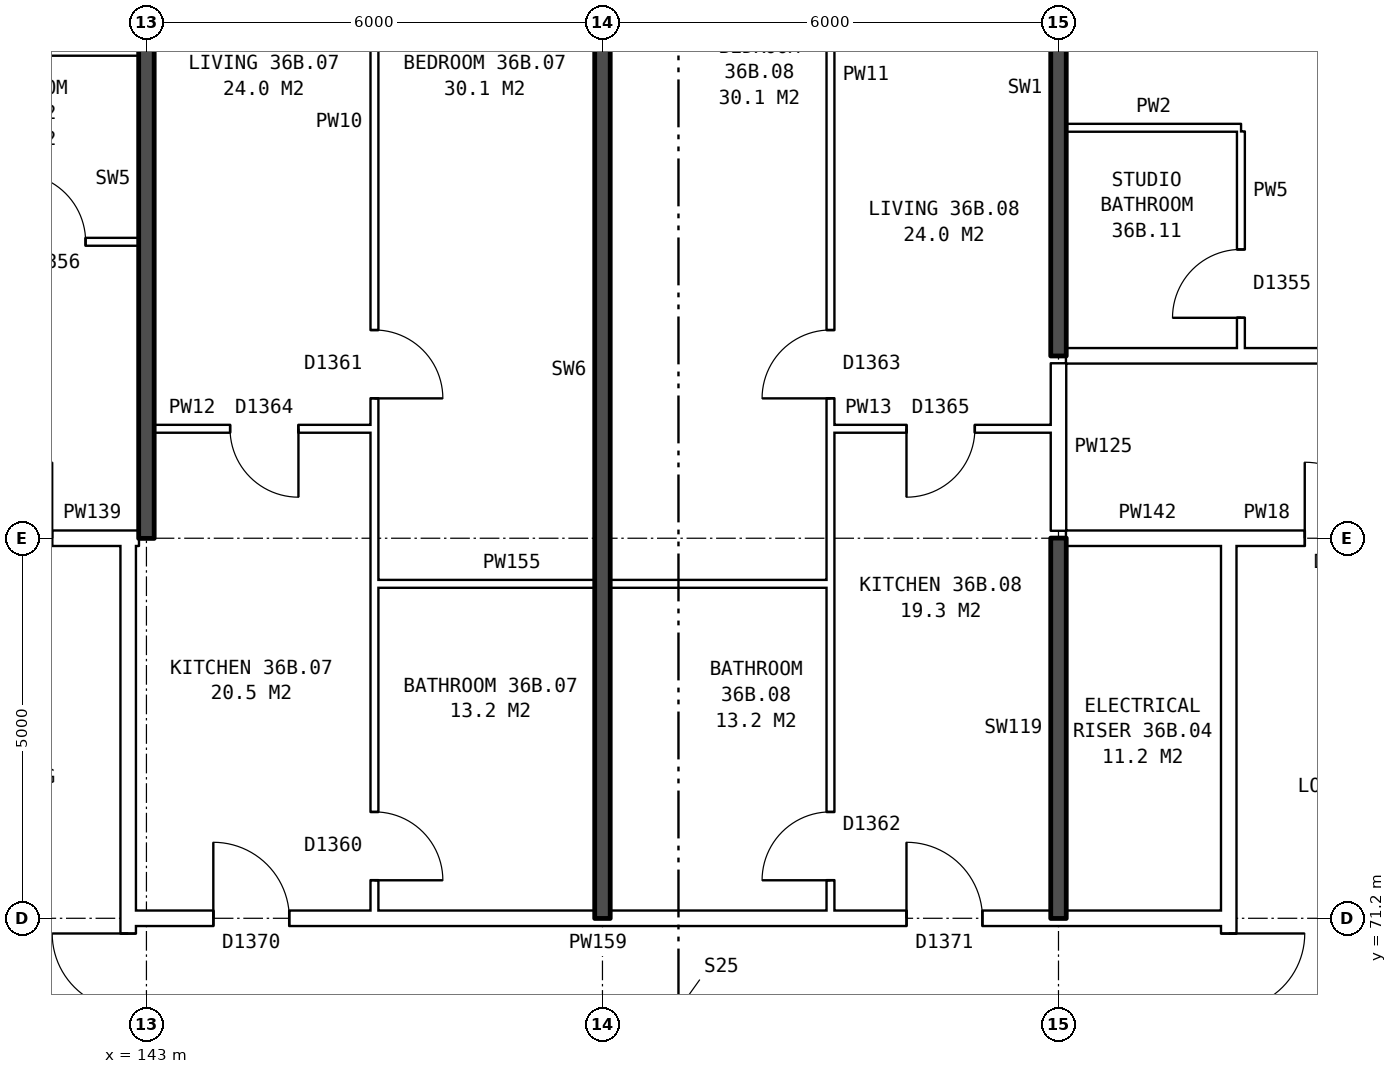
"""IFC4 building model, lengths in metres.
Left out: names, types, materials, properties, quantities, classifications, styles, units other than length and angle.
Written with IfcOpenShell. Run it as: python <this file> out.ifc"""

import sys

from ifc_helpers import new_model, si_unit, direction, frame, frame_2d, origin, place, context, subcontext, project, spatial, rectangle, extrude, element, fill, save


model = new_model("IFC4")
c1 = context("Model", 3, precision=1e-05, world=origin(), true_north=direction((0.0, 1.0)))
c2 = subcontext(c1, "Body", "Model", "MODEL_VIEW")
j1 = project(units=[si_unit("LENGTHUNIT", "METRE"), si_unit("PLANEANGLEUNIT", "RADIAN")], contexts=[c1])
p1 = place(None, origin())
s1 = spatial("IfcSite", under=j1, at=p1, CompositionType="ELEMENT")
p2 = place(p1, origin())
s2 = spatial("IfcBuilding", under=s1, at=p2, CompositionType="ELEMENT")
p3 = place(p2, frame((0.0, 0.0, 129.9)))
s3 = spatial("IfcBuildingStorey", under=s2, at=p3, CompositionType="ELEMENT", Elevation=129.9)
p4 = place(p3, frame((142.76, 63.9, 0.0), z_axis=(0.0, 0.0, 1.0), x_axis=(0.0, 1.0, 0.0)))
e1 = element("IfcWall", 1, at=p4, inside=s3, PredefinedType="PARTITIONING", context=c2, shape_type="SweptSolid", body=[
    extrude(rectangle(XDim=12.2, YDim=0.2, at=frame_2d((6.1, 0.0))), origin(), (0.0, 0.0, 1.0), 2.85),
])
p5 = place(p4, frame((5.1, 0.0, 0.0)))
e2 = element("IfcOpeningElement", 2, at=p5, cuts=e1, PredefinedType="OPENING", context=c2, shape_type="SweptSolid", body=[
    extrude(rectangle(XDim=2.0, YDim=2.1, at=frame_2d((1.0, 1.05))), frame((0.0, 0.11, 0.0), z_axis=(0.0, -1.0, 0.0), x_axis=(1.0, 0.0, 0.0)), (0.0, 0.0, 1.0), 0.22),
])
p6 = place(p3, frame((157.24, 63.9, 0.0), z_axis=(0.0, 0.0, 1.0), x_axis=(0.0, 1.0, 0.0)))
e3 = element("IfcWall", 3, at=p6, inside=s3, PredefinedType="PARTITIONING", context=c2, shape_type="SweptSolid", body=[
    extrude(rectangle(XDim=12.2, YDim=0.2, at=frame_2d((6.1, 0.0))), origin(), (0.0, 0.0, 1.0), 2.85),
])
p7 = place(p6, frame((5.1, 0.0, 0.0)))
e4 = element("IfcOpeningElement", 4, at=p7, cuts=e3, PredefinedType="OPENING", context=c2, shape_type="SweptSolid", body=[
    extrude(rectangle(XDim=2.0, YDim=2.1, at=frame_2d((1.0, 1.05))), frame((0.0, 0.11, 0.0), z_axis=(0.0, -1.0, 0.0), x_axis=(1.0, 0.0, 0.0)), (0.0, 0.0, 1.0), 0.22),
])
p8 = place(p3, frame((142.76, 71.2, 0.0), z_axis=(0.0, 0.0, 1.0), x_axis=(1.0, 0.0, 0.0)))
e5 = element("IfcWall", 5, at=p8, inside=s3, PredefinedType="PARTITIONING", context=c2, shape_type="SweptSolid", body=[
    extrude(rectangle(XDim=14.48, YDim=0.2, at=frame_2d((7.24, 0.0))), origin(), (0.0, 0.0, 1.0), 2.85),
])
p9 = place(p8, frame((1.12, 0.0, 0.0)))
e6 = element("IfcOpeningElement", 6, at=p9, cuts=e5, PredefinedType="OPENING", context=c2, shape_type="SweptSolid", body=[
    extrude(rectangle(XDim=1.0, YDim=2.1, at=frame_2d((0.5, 1.05))), frame((0.0, 0.11, 0.0), z_axis=(0.0, -1.0, 0.0), x_axis=(1.0, 0.0, 0.0)), (0.0, 0.0, 1.0), 0.22),
])
p10 = place(p8, frame((10.24, 0.0, 0.0)))
e7 = element("IfcOpeningElement", 7, at=p10, cuts=e5, PredefinedType="OPENING", context=c2, shape_type="SweptSolid", body=[
    extrude(rectangle(XDim=1.0, YDim=2.1, at=frame_2d((0.5, 1.05))), frame((0.0, 0.11, 0.0), z_axis=(0.0, -1.0, 0.0), x_axis=(1.0, 0.0, 0.0)), (0.0, 0.0, 1.0), 0.22),
])
p11 = place(p3, frame((146.0, 75.6, 0.0), z_axis=(0.0, 0.0, 1.0), x_axis=(1.0, 0.0, 0.0)))
e8 = element("IfcWall", 8, at=p11, inside=s3, PredefinedType="PARTITIONING", context=c2, shape_type="SweptSolid", body=[
    extrude(rectangle(XDim=6.0, YDim=0.1, at=frame_2d((3.0, 0.0))), origin(), (0.0, 0.0, 1.0), 2.85),
])
p12 = place(p3, frame((139.76, 76.2, 0.0), z_axis=(0.0, 0.0, 1.0), x_axis=(1.0, 0.0, 0.0)))
e9 = element("IfcWall", 9, at=p12, inside=s3, PredefinedType="PARTITIONING", context=c2, shape_type="SweptSolid", body=[
    extrude(rectangle(XDim=3.0, YDim=0.2, at=frame_2d((1.5, 0.0))), origin(), (0.0, 0.0, 1.0), 2.85),
])
p13 = place(p12, frame((1.0, 0.0, 0.0)))
e10 = element("IfcOpeningElement", 10, at=p13, cuts=e9, PredefinedType="OPENING", context=c2, shape_type="SweptSolid", body=[
    extrude(rectangle(XDim=1.0, YDim=2.1, at=frame_2d((0.5, 1.05))), frame((0.0, 0.11, 0.0), z_axis=(0.0, -1.0, 0.0), x_axis=(1.0, 0.0, 0.0)), (0.0, 0.0, 1.0), 0.22),
])
p14 = place(p3, frame((142.76, 76.2, 0.0), z_axis=(0.0, 0.0, 1.0), x_axis=(1.0, 0.0, 0.0)))
e11 = element("IfcWall", 11, at=p14, inside=s3, PredefinedType="PARTITIONING", context=c2, shape_type="SweptSolid", body=[
    extrude(rectangle(XDim=0.14, YDim=0.2, at=frame_2d((0.07, 0.0))), origin(), (0.0, 0.0, 1.0), 2.85),
])
p15 = place(p3, frame((155.1, 76.2, 0.0), z_axis=(0.0, 0.0, 1.0), x_axis=(1.0, 0.0, 0.0)))
e12 = element("IfcWall", 12, at=p15, inside=s3, PredefinedType="PARTITIONING", context=c2, shape_type="SweptSolid", body=[
    extrude(rectangle(XDim=2.14, YDim=0.2, at=frame_2d((1.07, 0.0))), origin(), (0.0, 0.0, 1.0), 2.85),
])
p16 = place(p3, frame((157.24, 76.2, 0.0), z_axis=(0.0, 0.0, 1.0), x_axis=(1.0, 0.0, 0.0)))
e13 = element("IfcWall", 13, at=p16, inside=s3, PredefinedType="PARTITIONING", context=c2, shape_type="SweptSolid", body=[
    extrude(rectangle(XDim=3.0, YDim=0.2, at=frame_2d((1.5, 0.0))), origin(), (0.0, 0.0, 1.0), 2.85),
])
p17 = place(p16, frame((1.0, 0.0, 0.0)))
e14 = element("IfcOpeningElement", 14, at=p17, cuts=e13, PredefinedType="OPENING", context=c2, shape_type="SweptSolid", body=[
    extrude(rectangle(XDim=1.0, YDim=2.1, at=frame_2d((0.5, 1.05))), frame((0.0, 0.11, 0.0), z_axis=(0.0, -1.0, 0.0), x_axis=(1.0, 0.0, 0.0)), (0.0, 0.0, 1.0), 0.22),
])
p18 = place(p3, frame((143.1, 77.64, 0.0), z_axis=(0.0, 0.0, 1.0), x_axis=(1.0, 0.0, 0.0)))
e15 = element("IfcWall", 15, at=p18, inside=s3, PredefinedType="PARTITIONING", context=c2, shape_type="SweptSolid", body=[
    extrude(rectangle(XDim=2.9, YDim=0.1, at=frame_2d((1.45, 0.0))), origin(), (0.0, 0.0, 1.0), 2.85),
])
p19 = place(p18, frame((1.0, 0.0, 0.0)))
e16 = element("IfcOpeningElement", 16, at=p19, cuts=e15, PredefinedType="OPENING", context=c2, shape_type="SweptSolid", body=[
    extrude(rectangle(XDim=0.9, YDim=2.1, at=frame_2d((0.45, 1.05))), frame((0.0, 0.06, 0.0), z_axis=(0.0, -1.0, 0.0), x_axis=(1.0, 0.0, 0.0)), (0.0, 0.0, 1.0), 0.12),
])
p20 = place(p3, frame((152.0, 77.64, 0.0), z_axis=(0.0, 0.0, 1.0), x_axis=(1.0, 0.0, 0.0)))
e17 = element("IfcWall", 17, at=p20, inside=s3, PredefinedType="PARTITIONING", context=c2, shape_type="SweptSolid", body=[
    extrude(rectangle(XDim=2.9, YDim=0.1, at=frame_2d((1.45, 0.0))), origin(), (0.0, 0.0, 1.0), 2.85),
])
p21 = place(p20, frame((1.0, 0.0, 0.0)))
e18 = element("IfcOpeningElement", 18, at=p21, cuts=e17, PredefinedType="OPENING", context=c2, shape_type="SweptSolid", body=[
    extrude(rectangle(XDim=0.9, YDim=2.1, at=frame_2d((0.45, 1.05))), frame((0.0, 0.06, 0.0), z_axis=(0.0, -1.0, 0.0), x_axis=(1.0, 0.0, 0.0)), (0.0, 0.0, 1.0), 0.12),
])
p22 = place(p3, frame((155.1, 78.6, 0.0), z_axis=(0.0, 0.0, 1.0), x_axis=(1.0, 0.0, 0.0)))
e19 = element("IfcWall", 19, at=p22, inside=s3, PredefinedType="PARTITIONING", context=c2, shape_type="SweptSolid", body=[
    extrude(rectangle(XDim=17.29, YDim=0.2, at=frame_2d((8.645, 0.0))), origin(), (0.0, 0.0, 1.0), 2.85),
])
p23 = place(p22, frame((3.6, 0.0, 0.0)))
e20 = element("IfcOpeningElement", 20, at=p23, cuts=e19, PredefinedType="OPENING", context=c2, shape_type="SweptSolid", body=[
    extrude(rectangle(XDim=1.0, YDim=2.1, at=frame_2d((0.5, 1.05))), frame((0.0, 0.11, 0.0), z_axis=(0.0, -1.0, 0.0), x_axis=(1.0, 0.0, 0.0)), (0.0, 0.0, 1.0), 0.22),
])
p24 = place(p22, frame((8.4, 0.0, 0.0)))
e21 = element("IfcOpeningElement", 21, at=p24, cuts=e19, PredefinedType="OPENING", context=c2, shape_type="SweptSolid", body=[
    extrude(rectangle(XDim=1.0, YDim=2.1, at=frame_2d((0.5, 1.05))), frame((0.0, 0.11, 0.0), z_axis=(0.0, -1.0, 0.0), x_axis=(1.0, 0.0, 0.0)), (0.0, 0.0, 1.0), 0.22),
])
p25 = place(p3, frame((137.1, 80.1, 0.0), z_axis=(0.0, 0.0, 1.0), x_axis=(1.0, 0.0, 0.0)))
e22 = element("IfcWall", 22, at=p25, inside=s3, PredefinedType="PARTITIONING", context=c2, shape_type="SweptSolid", body=[
    extrude(rectangle(XDim=5.8, YDim=0.1, at=frame_2d((2.9, 0.0))), origin(), (0.0, 0.0, 1.0), 2.85),
])
p26 = place(p25, frame((1.3, 0.0, 0.0)))
e23 = element("IfcOpeningElement", 23, at=p26, cuts=e22, PredefinedType="OPENING", context=c2, shape_type="SweptSolid", body=[
    extrude(rectangle(XDim=0.9, YDim=2.1, at=frame_2d((0.45, 1.05))), frame((0.0, 0.06, 0.0), z_axis=(0.0, -1.0, 0.0), x_axis=(1.0, 0.0, 0.0)), (0.0, 0.0, 1.0), 0.12),
])
p27 = place(p25, frame((4.2, 0.0, 0.0)))
e24 = element("IfcOpeningElement", 24, at=p27, cuts=e22, PredefinedType="OPENING", context=c2, shape_type="SweptSolid", body=[
    extrude(rectangle(XDim=0.9, YDim=2.1, at=frame_2d((0.45, 1.05))), frame((0.0, 0.06, 0.0), z_axis=(0.0, -1.0, 0.0), x_axis=(1.0, 0.0, 0.0)), (0.0, 0.0, 1.0), 0.12),
])
for number, where, z_axis, x_axis in (
    (25, (155.1, 81.6, 0.0), (0.0, 0.0, 1.0), (1.0, 0.0, 0.0)),
    (26, (140.6, 82.6, 0.0), (0.0, 0.0, 1.0), (1.0, 0.0, 0.0)),
):
    element("IfcWall", number, at=place(p3, frame(where, z_axis=z_axis, x_axis=x_axis)), inside=s3, PredefinedType="PARTITIONING", context=c2, shape_type="SweptSolid", body=[
        extrude(rectangle(XDim=2.3, YDim=0.1, at=frame_2d((1.15, 0.0))), origin(), (0.0, 0.0, 1.0), 2.85),
    ])
p28 = place(p3, frame((143.0, 76.2, 0.0), z_axis=(0.0, 0.0, 1.0), x_axis=(0.0, 1.0, 0.0)))
e27 = element("IfcWall", 27, at=p28, inside=s3, PredefinedType="SOLIDWALL", context=c2, shape_type="SweptSolid", body=[
    extrude(rectangle(XDim=9.44, YDim=0.2, at=frame_2d((4.72, 0.0))), origin(), (0.0, 0.0, 1.0), 2.85),
])
p29 = place(p3, frame((146.0, 71.3, 0.0), z_axis=(0.0, 0.0, 1.0), x_axis=(0.0, 1.0, 0.0)))
e28 = element("IfcWall", 28, at=p29, inside=s3, PredefinedType="PARTITIONING", context=c2, shape_type="SweptSolid", body=[
    extrude(rectangle(XDim=14.34, YDim=0.1, at=frame_2d((7.17, 0.0))), origin(), (0.0, 0.0, 1.0), 2.85),
])
p30 = place(p29, frame((6.74, 0.0, 0.0)))
e29 = element("IfcOpeningElement", 29, at=p30, cuts=e28, PredefinedType="OPENING", context=c2, shape_type="SweptSolid", body=[
    extrude(rectangle(XDim=0.9, YDim=2.1, at=frame_2d((0.45, 1.05))), frame((0.0, 0.06, 0.0), z_axis=(0.0, -1.0, 0.0), x_axis=(1.0, 0.0, 0.0)), (0.0, 0.0, 1.0), 0.12),
])
p31 = place(p29, frame((0.4, 0.0, 0.0)))
e30 = element("IfcOpeningElement", 30, at=p31, cuts=e28, PredefinedType="OPENING", context=c2, shape_type="SweptSolid", body=[
    extrude(rectangle(XDim=0.9, YDim=2.1, at=frame_2d((0.45, 1.05))), frame((0.0, 0.06, 0.0), z_axis=(0.0, -1.0, 0.0), x_axis=(1.0, 0.0, 0.0)), (0.0, 0.0, 1.0), 0.12),
])
p32 = place(p3, frame((149.0, 71.2, 0.0), z_axis=(0.0, 0.0, 1.0), x_axis=(0.0, 1.0, 0.0)))
e31 = element("IfcWall", 31, at=p32, inside=s3, PredefinedType="SOLIDWALL", context=c2, shape_type="SweptSolid", body=[
    extrude(rectangle(XDim=14.44, YDim=0.2, at=frame_2d((7.22, 0.0))), origin(), (0.0, 0.0, 1.0), 2.85),
])
p33 = place(p3, frame((152.0, 71.3, 0.0), z_axis=(0.0, 0.0, 1.0), x_axis=(0.0, 1.0, 0.0)))
e32 = element("IfcWall", 32, at=p33, inside=s3, PredefinedType="PARTITIONING", context=c2, shape_type="SweptSolid", body=[
    extrude(rectangle(XDim=14.34, YDim=0.1, at=frame_2d((7.17, 0.0))), origin(), (0.0, 0.0, 1.0), 2.85),
])
p34 = place(p33, frame((6.74, 0.0, 0.0)))
e33 = element("IfcOpeningElement", 33, at=p34, cuts=e32, PredefinedType="OPENING", context=c2, shape_type="SweptSolid", body=[
    extrude(rectangle(XDim=0.9, YDim=2.1, at=frame_2d((0.45, 1.05))), frame((0.0, 0.06, 0.0), z_axis=(0.0, -1.0, 0.0), x_axis=(1.0, 0.0, 0.0)), (0.0, 0.0, 1.0), 0.12),
])
p35 = place(p33, frame((0.4, 0.0, 0.0)))
e34 = element("IfcOpeningElement", 34, at=p35, cuts=e32, PredefinedType="OPENING", context=c2, shape_type="SweptSolid", body=[
    extrude(rectangle(XDim=0.9, YDim=2.1, at=frame_2d((0.45, 1.05))), frame((0.0, 0.06, 0.0), z_axis=(0.0, -1.0, 0.0), x_axis=(1.0, 0.0, 0.0)), (0.0, 0.0, 1.0), 0.12),
])
p36 = place(p3, frame((155.0, 71.2, 0.0), z_axis=(0.0, 0.0, 1.0), x_axis=(0.0, 1.0, 0.0)))
e35 = element("IfcWall", 35, at=p36, inside=s3, PredefinedType="SOLIDWALL", context=c2, shape_type="SweptSolid", body=[
    extrude(rectangle(XDim=5.0, YDim=0.2, at=frame_2d((2.5, 0.0))), origin(), (0.0, 0.0, 1.0), 2.85),
])
p37 = place(p3, frame((155.0, 76.3, 0.0), z_axis=(0.0, 0.0, 1.0), x_axis=(0.0, 1.0, 0.0)))
e36 = element("IfcWall", 36, at=p37, inside=s3, PredefinedType="PARTITIONING", context=c2, shape_type="SweptSolid", body=[
    extrude(rectangle(XDim=2.2, YDim=0.2, at=frame_2d((1.1, 0.0))), origin(), (0.0, 0.0, 1.0), 2.85),
])
p38 = place(p3, frame((155.0, 78.6, 0.0), z_axis=(0.0, 0.0, 1.0), x_axis=(0.0, 1.0, 0.0)))
e37 = element("IfcWall", 37, at=p38, inside=s3, PredefinedType="SOLIDWALL", context=c2, shape_type="SweptSolid", body=[
    extrude(rectangle(XDim=7.04, YDim=0.2, at=frame_2d((3.52, 0.0))), origin(), (0.0, 0.0, 1.0), 2.85),
])
p39 = place(p3, frame((157.4, 78.7, 0.0), z_axis=(0.0, 0.0, 1.0), x_axis=(0.0, 1.0, 0.0)))
e38 = element("IfcWall", 38, at=p39, inside=s3, PredefinedType="PARTITIONING", context=c2, shape_type="SweptSolid", body=[
    extrude(rectangle(XDim=2.85, YDim=0.1, at=frame_2d((1.425, 0.0))), origin(), (0.0, 0.0, 1.0), 2.85),
])
p40 = place(p39, frame((0.4, 0.0, 0.0)))
e39 = element("IfcOpeningElement", 39, at=p40, cuts=e38, PredefinedType="OPENING", context=c2, shape_type="SweptSolid", body=[
    extrude(rectangle(XDim=0.9, YDim=2.1, at=frame_2d((0.45, 1.05))), frame((0.0, 0.06, 0.0), z_axis=(0.0, -1.0, 0.0), x_axis=(1.0, 0.0, 0.0)), (0.0, 0.0, 1.0), 0.12),
])
p41 = place(p5, origin())
e40 = element("IfcDoor", 40, at=p41, inside=s3, OperationType="DOUBLE_DOOR_SINGLE_SWING", PredefinedType="DOOR", context=c2, shape_type="SweptSolid", body=[
    extrude(rectangle(XDim=2.0, YDim=2.1, at=frame_2d((1.0, 1.05))), frame((0.0, 0.025, 0.0), z_axis=(0.0, -1.0, 0.0), x_axis=(1.0, 0.0, 0.0)), (0.0, 0.0, 1.0), 0.05),
])
fill(e2, e40)
p42 = place(p7, frame((2.0, 0.0, 0.0), z_axis=(0.0, 0.0, 1.0), x_axis=(-1.0, 0.0, 0.0)))
e41 = element("IfcDoor", 41, at=p42, inside=s3, OperationType="DOUBLE_DOOR_SINGLE_SWING", PredefinedType="DOOR", context=c2, shape_type="SweptSolid", body=[
    extrude(rectangle(XDim=2.0, YDim=2.1, at=frame_2d((1.0, 1.05))), frame((0.0, 0.025, 0.0), z_axis=(0.0, -1.0, 0.0), x_axis=(1.0, 0.0, 0.0)), (0.0, 0.0, 1.0), 0.05),
])
fill(e4, e41)
p43 = place(p17, origin())
e42 = element("IfcDoor", 42, at=p43, inside=s3, OperationType="SINGLE_SWING_LEFT", PredefinedType="DOOR", context=c2, shape_type="SweptSolid", body=[
    extrude(rectangle(XDim=1.0, YDim=2.1, at=frame_2d((0.5, 1.05))), frame((0.0, 0.025, 0.0), z_axis=(0.0, -1.0, 0.0), x_axis=(1.0, 0.0, 0.0)), (0.0, 0.0, 1.0), 0.05),
])
fill(e14, e42)
p44 = place(p27, origin())
e43 = element("IfcDoor", 43, at=p44, inside=s3, OperationType="SINGLE_SWING_LEFT", PredefinedType="DOOR", context=c2, shape_type="SweptSolid", body=[
    extrude(rectangle(XDim=0.9, YDim=2.1, at=frame_2d((0.45, 1.05))), frame((0.0, 0.025, 0.0), z_axis=(0.0, -1.0, 0.0), x_axis=(1.0, 0.0, 0.0)), (0.0, 0.0, 1.0), 0.05),
])
fill(e24, e43)
p45 = place(p30, frame((0.9, 0.0, 0.0), z_axis=(0.0, 0.0, 1.0), x_axis=(-1.0, 0.0, 0.0)))
e44 = element("IfcDoor", 44, at=p45, inside=s3, OperationType="SINGLE_SWING_RIGHT", PredefinedType="DOOR", context=c2, shape_type="SweptSolid", body=[
    extrude(rectangle(XDim=0.9, YDim=2.1, at=frame_2d((0.45, 1.05))), frame((0.0, 0.025, 0.0), z_axis=(0.0, -1.0, 0.0), x_axis=(1.0, 0.0, 0.0)), (0.0, 0.0, 1.0), 0.05),
])
fill(e29, e44)
p46 = place(p9, origin())
e45 = element("IfcDoor", 45, at=p46, inside=s3, OperationType="SINGLE_SWING_LEFT", PredefinedType="DOOR", context=c2, shape_type="SweptSolid", body=[
    extrude(rectangle(XDim=1.0, YDim=2.1, at=frame_2d((0.5, 1.05))), frame((0.0, 0.025, 0.0), z_axis=(0.0, -1.0, 0.0), x_axis=(1.0, 0.0, 0.0)), (0.0, 0.0, 1.0), 0.05),
])
fill(e6, e45)
p47 = place(p19, frame((0.9, 0.0, 0.0), z_axis=(0.0, 0.0, 1.0), x_axis=(-1.0, 0.0, 0.0)))
e46 = element("IfcDoor", 46, at=p47, inside=s3, OperationType="SINGLE_SWING_LEFT", PredefinedType="DOOR", context=c2, shape_type="SweptSolid", body=[
    extrude(rectangle(XDim=0.9, YDim=2.1, at=frame_2d((0.45, 1.05))), frame((0.0, 0.025, 0.0), z_axis=(0.0, -1.0, 0.0), x_axis=(1.0, 0.0, 0.0)), (0.0, 0.0, 1.0), 0.05),
])
fill(e16, e46)
p48 = place(p31, frame((0.9, 0.0, 0.0), z_axis=(0.0, 0.0, 1.0), x_axis=(-1.0, 0.0, 0.0)))
e47 = element("IfcDoor", 47, at=p48, inside=s3, OperationType="SINGLE_SWING_RIGHT", PredefinedType="DOOR", context=c2, shape_type="SweptSolid", body=[
    extrude(rectangle(XDim=0.9, YDim=2.1, at=frame_2d((0.45, 1.05))), frame((0.0, 0.025, 0.0), z_axis=(0.0, -1.0, 0.0), x_axis=(1.0, 0.0, 0.0)), (0.0, 0.0, 1.0), 0.05),
])
fill(e30, e47)
p49 = place(p34, origin())
e48 = element("IfcDoor", 48, at=p49, inside=s3, OperationType="SINGLE_SWING_LEFT", PredefinedType="DOOR", context=c2, shape_type="SweptSolid", body=[
    extrude(rectangle(XDim=0.9, YDim=2.1, at=frame_2d((0.45, 1.05))), frame((0.0, 0.025, 0.0), z_axis=(0.0, -1.0, 0.0), x_axis=(1.0, 0.0, 0.0)), (0.0, 0.0, 1.0), 0.05),
])
fill(e33, e48)
p50 = place(p10, origin())
e49 = element("IfcDoor", 49, at=p50, inside=s3, OperationType="SINGLE_SWING_LEFT", PredefinedType="DOOR", context=c2, shape_type="SweptSolid", body=[
    extrude(rectangle(XDim=1.0, YDim=2.1, at=frame_2d((0.5, 1.05))), frame((0.0, 0.025, 0.0), z_axis=(0.0, -1.0, 0.0), x_axis=(1.0, 0.0, 0.0)), (0.0, 0.0, 1.0), 0.05),
])
fill(e7, e49)
p51 = place(p21, frame((0.9, 0.0, 0.0), z_axis=(0.0, 0.0, 1.0), x_axis=(-1.0, 0.0, 0.0)))
e50 = element("IfcDoor", 50, at=p51, inside=s3, OperationType="SINGLE_SWING_RIGHT", PredefinedType="DOOR", context=c2, shape_type="SweptSolid", body=[
    extrude(rectangle(XDim=0.9, YDim=2.1, at=frame_2d((0.45, 1.05))), frame((0.0, 0.025, 0.0), z_axis=(0.0, -1.0, 0.0), x_axis=(1.0, 0.0, 0.0)), (0.0, 0.0, 1.0), 0.05),
])
fill(e18, e50)
p52 = place(p35, origin())
e51 = element("IfcDoor", 51, at=p52, inside=s3, OperationType="SINGLE_SWING_LEFT", PredefinedType="DOOR", context=c2, shape_type="SweptSolid", body=[
    extrude(rectangle(XDim=0.9, YDim=2.1, at=frame_2d((0.45, 1.05))), frame((0.0, 0.025, 0.0), z_axis=(0.0, -1.0, 0.0), x_axis=(1.0, 0.0, 0.0)), (0.0, 0.0, 1.0), 0.05),
])
fill(e34, e51)
p53 = place(p40, origin())
e52 = element("IfcDoor", 52, at=p53, inside=s3, OperationType="SINGLE_SWING_LEFT", PredefinedType="DOOR", context=c2, shape_type="SweptSolid", body=[
    extrude(rectangle(XDim=0.9, YDim=2.1, at=frame_2d((0.45, 1.05))), frame((0.0, 0.025, 0.0), z_axis=(0.0, -1.0, 0.0), x_axis=(1.0, 0.0, 0.0)), (0.0, 0.0, 1.0), 0.05),
])
fill(e39, e52)
save(model, sys.argv[1])
